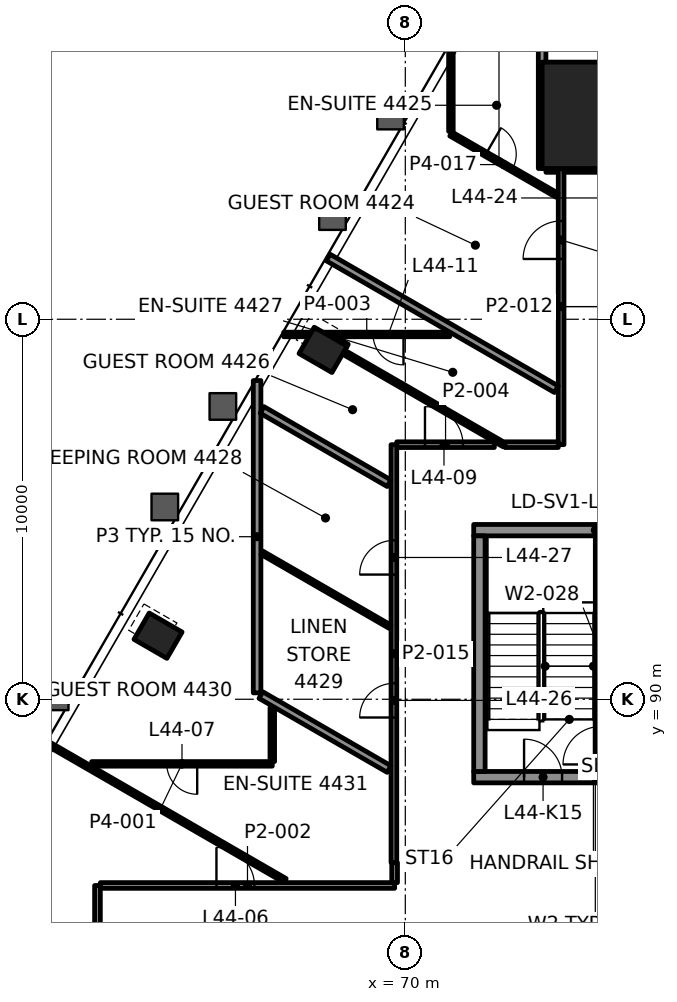
"""IFC4 building model, lengths in metres.
Left out: names, types, materials, properties, quantities, classifications, styles, units other than length and angle.
Written with IfcOpenShell. Run it as: python <this file> out.ifc"""

import sys

from ifc_helpers import new_model, si_unit, direction, frame, frame_2d, origin, origin_2d, place, context, subcontext, project, spatial, rectangle, hollow_rectangle, extrude, element, fill, save


model = new_model("IFC4")
c1 = context("Model", 3, precision=1e-05, world=origin(), true_north=direction((0.0, 1.0)))
c2 = subcontext(c1, "Body", "Model", "MODEL_VIEW")
j1 = project(units=[si_unit("LENGTHUNIT", "METRE"), si_unit("PLANEANGLEUNIT", "RADIAN")], contexts=[c1])
p1 = place(None, origin())
s1 = spatial("IfcSite", under=j1, at=p1, CompositionType="ELEMENT")
p2 = place(p1, origin())
s2 = spatial("IfcBuilding", under=s1, at=p2, CompositionType="ELEMENT")
p3 = place(p2, frame((0.0, 0.0, 190.9)))
s3 = spatial("IfcBuildingStorey", under=s2, at=p3, CompositionType="ELEMENT", Elevation=190.9)
p4 = place(p3, frame((75.0, 105.367, 0.0), z_axis=(0.0, 0.0, 1.0), x_axis=(-1.0, 0.0, 0.0)))
e1 = element("IfcColumn", 1, at=p4, inside=s3, PredefinedType="COLUMN", context=c2, shape_type="SweptSolid", body=[
    extrude(rectangle(XDim=2.8, YDim=2.8, at=origin_2d()), origin(), (0.0, 0.0, 1.0), 3.9),
])
for number, where, z_axis, x_axis in (
    (2, (67.836, 99.195, -0.0), (0.0, 0.0, 1.0), (-0.5, -0.866, 0.0)),
    (3, (63.494, 91.673, -0.0), (0.0, 0.0, 1.0), (-0.5, -0.866, 0.0)),
):
    element("IfcColumn", number, at=place(p3, frame(where, z_axis=z_axis, x_axis=x_axis)), inside=s3, PredefinedType="COLUMN", context=c2, shape_type="SweptSolid", body=[
        extrude(hollow_rectangle(XDim=0.8, YDim=1.0, WallThickness=0.05, at=origin_2d()), origin(), (0.0, 0.0, 1.0), 3.9),
    ])
p5 = place(p3, frame((71.8, 87.95, 0.0), z_axis=(0.0, 0.0, 1.0), x_axis=(1.0, 0.0, 0.0)))
e4 = element("IfcWall", 4, at=p5, inside=s3, PredefinedType="SHEAR", context=c2, shape_type="SweptSolid", body=[
    extrude(rectangle(XDim=6.4, YDim=0.3, at=frame_2d((3.2, 0.0))), origin(), (0.0, 0.0, 1.0), 3.7),
])
p6 = place(p5, frame((1.325, 0.0, 0.0)))
e5 = element("IfcOpeningElement", 5, at=p6, cuts=e4, PredefinedType="OPENING", context=c2, shape_type="SweptSolid", body=[
    extrude(rectangle(XDim=1.0, YDim=2.1, at=frame_2d((0.5, 1.05))), frame((0.0, 0.16, 0.0), z_axis=(0.0, -1.0, 0.0), x_axis=(1.0, 0.0, 0.0)), (0.0, 0.0, 1.0), 0.32),
])
p7 = place(p5, frame((4.125, 0.0, 0.0)))
e6 = element("IfcOpeningElement", 6, at=p7, cuts=e4, PredefinedType="OPENING", context=c2, shape_type="SweptSolid", body=[
    extrude(rectangle(XDim=1.2, YDim=2.1, at=frame_2d((0.6, 1.05))), frame((0.0, 0.16, 0.0), z_axis=(0.0, -1.0, 0.0), x_axis=(1.0, 0.0, 0.0)), (0.0, 0.0, 1.0), 0.32),
])
p8 = place(p3, frame((71.8, 94.45, 0.0), z_axis=(0.0, 0.0, 1.0), x_axis=(1.0, 0.0, 0.0)))
e7 = element("IfcWall", 7, at=p8, inside=s3, PredefinedType="SHEAR", context=c2, shape_type="SweptSolid", body=[
    extrude(rectangle(XDim=6.4, YDim=0.3, at=frame_2d((3.2, 0.0))), origin(), (0.0, 0.0, 1.0), 3.7),
])
p9 = place(p3, frame((71.95, 88.1, 0.0), z_axis=(0.0, 0.0, 1.0), x_axis=(0.0, 1.0, 0.0)))
e8 = element("IfcWall", 8, at=p9, inside=s3, PredefinedType="SHEAR", context=c2, shape_type="SweptSolid", body=[
    extrude(rectangle(XDim=6.2, YDim=0.3, at=frame_2d((3.1, 0.0))), origin(), (0.0, 0.0, 1.0), 3.7),
])
p10 = place(p3, frame((75.15, 88.1, 0.0), z_axis=(0.0, 0.0, 1.0), x_axis=(0.0, 1.0, 0.0)))
e9 = element("IfcWall", 9, at=p10, inside=s3, PredefinedType="SHEAR", context=c2, shape_type="SweptSolid", body=[
    extrude(rectangle(XDim=6.2, YDim=0.3, at=frame_2d((3.1, 0.0))), origin(), (0.0, 0.0, 1.0), 3.7),
])
p11 = place(p10, frame((0.185, 0.0, 0.0)))
e10 = element("IfcOpeningElement", 10, at=p11, cuts=e9, PredefinedType="OPENING", context=c2, shape_type="SweptSolid", body=[
    extrude(rectangle(XDim=1.0, YDim=2.1, at=frame_2d((0.5, 1.05))), frame((0.0, 0.16, 0.0), z_axis=(0.0, -1.0, 0.0), x_axis=(1.0, 0.0, 0.0)), (0.0, 0.0, 1.0), 0.32),
])
p12 = place(p3, frame((61.976, 85.1, 0.0), z_axis=(0.0, 0.0, 1.0), x_axis=(1.0, 0.0, 0.0)))
e11 = element("IfcWall", 11, at=p12, inside=s3, PredefinedType="PARTITIONING", context=c2, shape_type="SweptSolid", body=[
    extrude(rectangle(XDim=7.744, YDim=0.15, at=frame_2d((3.872, 0.0))), origin(), (0.0, 0.0, 1.0), 3.1),
])
p13 = place(p12, frame((3.055, 0.0, 0.0)))
e12 = element("IfcOpeningElement", 12, at=p13, cuts=e11, PredefinedType="OPENING", context=c2, shape_type="SweptSolid", body=[
    extrude(rectangle(XDim=1.0, YDim=2.1, at=frame_2d((0.5, 1.05))), frame((0.0, 0.085, 0.0), z_axis=(0.0, -1.0, 0.0), x_axis=(1.0, 0.0, 0.0)), (0.0, 0.0, 1.0), 0.17),
])
p14 = place(p3, frame((66.5, 88.3, 0.0), z_axis=(0.0, 0.0, 1.0), x_axis=(-1.0, 0.0, 0.0)))
e13 = element("IfcWall", 13, at=p14, inside=s3, PredefinedType="PARTITIONING", context=c2, shape_type="SweptSolid", body=[
    extrude(rectangle(XDim=4.751, YDim=0.12, at=frame_2d((2.376, 0.0))), origin(), (0.0, 0.0, 1.0), 3.097),
])
p15 = place(p14, frame((1.976, 0.0, 0.0)))
e14 = element("IfcOpeningElement", 14, at=p15, cuts=e13, PredefinedType="OPENING", context=c2, shape_type="SweptSolid", body=[
    extrude(rectangle(XDim=0.8, YDim=2.1, at=frame_2d((0.4, 1.05))), frame((0.0, 0.07, 0.0), z_axis=(0.0, -1.0, 0.0), x_axis=(1.0, 0.0, 0.0)), (0.0, 0.0, 1.0), 0.14),
])
p16 = place(p3, frame((69.775, 96.7, 0.0), z_axis=(0.0, 0.0, 1.0), x_axis=(1.0, 0.0, 0.0)))
e15 = element("IfcWall", 15, at=p16, inside=s3, PredefinedType="PARTITIONING", context=c2, shape_type="SweptSolid", body=[
    extrude(rectangle(XDim=2.567, YDim=0.15, at=frame_2d((1.284, 0.0))), origin(), (0.0, 0.0, 1.0), 3.1),
])
p17 = place(p16, frame((0.742, 0.0, 0.0)))
e16 = element("IfcOpeningElement", 16, at=p17, cuts=e15, PredefinedType="OPENING", context=c2, shape_type="SweptSolid", body=[
    extrude(rectangle(XDim=1.0, YDim=2.1, at=frame_2d((0.5, 1.05))), frame((0.0, 0.085, 0.0), z_axis=(0.0, -1.0, 0.0), x_axis=(1.0, 0.0, 0.0)), (0.0, 0.0, 1.0), 0.17),
])
p18 = place(p3, frame((71.17, 99.6, 0.0), z_axis=(0.0, 0.0, 1.0), x_axis=(-1.0, 0.0, 0.0)))
e17 = element("IfcWall", 17, at=p18, inside=s3, PredefinedType="PARTITIONING", context=c2, shape_type="SweptSolid", body=[
    extrude(rectangle(XDim=4.37, YDim=0.12, at=frame_2d((2.185, 0.0))), origin(), (0.0, 0.0, 1.0), 3.1),
])
p19 = place(p18, frame((1.218, 0.0, 0.0)))
e18 = element("IfcOpeningElement", 18, at=p19, cuts=e17, PredefinedType="OPENING", context=c2, shape_type="SweptSolid", body=[
    extrude(rectangle(XDim=0.8, YDim=2.1, at=frame_2d((0.4, 1.05))), frame((0.0, 0.07, 0.0), z_axis=(0.0, -1.0, 0.0), x_axis=(1.0, 0.0, 0.0)), (0.0, 0.0, 1.0), 0.14),
])
p20 = place(p3, frame((73.7, 103.967, 0.0), z_axis=(0.0, 0.0, 1.0), x_axis=(1.0, 0.0, 0.0)))
e19 = element("IfcWall", 19, at=p20, inside=s3, PredefinedType="PARTITIONING", context=c2, shape_type="SweptSolid", body=[
    extrude(rectangle(XDim=0.324, YDim=0.2, at=frame_2d((0.162, 0.0))), origin(), (0.0, 0.0, 1.0), 3.1),
])
p21 = place(p3, frame((74.1, 96.7, 0.0), z_axis=(0.0, 0.0, 1.0), x_axis=(0.0, 1.0, 0.0)))
e20 = element("IfcWall", 20, at=p21, inside=s3, PredefinedType="PARTITIONING", context=c2, shape_type="SweptSolid", body=[
    extrude(rectangle(XDim=7.267, YDim=0.15, at=frame_2d((3.633, 0.0))), origin(), (0.0, 0.0, 1.0), 3.1),
])
p22 = place(p21, frame((4.886, 0.0, 0.0)))
e21 = element("IfcOpeningElement", 21, at=p22, cuts=e20, PredefinedType="OPENING", context=c2, shape_type="SweptSolid", body=[
    extrude(rectangle(XDim=1.0, YDim=2.1, at=frame_2d((0.5, 1.05))), frame((0.0, 0.085, 0.0), z_axis=(0.0, -1.0, 0.0), x_axis=(1.0, 0.0, 0.0)), (0.0, 0.0, 1.0), 0.17),
])
p23 = place(p3, frame((73.6, 103.967, 0.0), z_axis=(0.0, 0.0, 1.0), x_axis=(0.0, 1.0, 0.0)))
e22 = element("IfcWall", 22, at=p23, inside=s3, PredefinedType="PARTITIONING", context=c2, shape_type="SweptSolid", body=[
    extrude(rectangle(XDim=3.26, YDim=0.2, at=frame_2d((1.63, 0.0))), origin(), (0.0, 0.0, 1.0), 3.1),
])
p24 = place(p3, frame((71.2, 104.945, 0.0), z_axis=(0.0, 0.0, 1.0), x_axis=(0.0, 1.0, 0.0)))
e23 = element("IfcWall", 23, at=p24, inside=s3, PredefinedType="PARTITIONING", context=c2, shape_type="SweptSolid", body=[
    extrude(rectangle(XDim=2.252, YDim=0.12, at=frame_2d((1.126, 0.0))), origin(), (0.0, 0.0, 1.0), 3.1),
])
p25 = place(p3, frame((69.719, 85.175, 0.0), z_axis=(0.0, 0.0, 1.0), x_axis=(0.0, 1.0, 0.0)))
e24 = element("IfcWall", 24, at=p25, inside=s3, PredefinedType="PARTITIONING", context=c2, shape_type="SweptSolid", body=[
    extrude(rectangle(XDim=0.525, YDim=0.15, at=frame_2d((0.262, 0.0))), origin(), (0.0, 0.0, 1.0), 3.1),
])
p26 = place(p3, frame((69.7, 85.7, 0.0), z_axis=(0.0, 0.0, 1.0), x_axis=(0.0, 1.0, 0.0)))
e25 = element("IfcWall", 25, at=p26, inside=s3, PredefinedType="PARTITIONING", context=c2, shape_type="SweptSolid", body=[
    extrude(rectangle(XDim=10.999, YDim=0.15, at=frame_2d((5.5, 0.0))), origin(), (0.0, 0.0, 1.0), 3.097),
])
p27 = place(p26, frame((3.82, 0.0, 0.0)))
e26 = element("IfcOpeningElement", 26, at=p27, cuts=e25, PredefinedType="OPENING", context=c2, shape_type="SweptSolid", body=[
    extrude(rectangle(XDim=0.9, YDim=2.1, at=frame_2d((0.45, 1.05))), frame((0.0, 0.085, 0.0), z_axis=(0.0, -1.0, 0.0), x_axis=(1.0, 0.0, 0.0)), (0.0, 0.0, 1.0), 0.17),
])
p28 = place(p26, frame((7.581, 0.0, 0.0)))
e27 = element("IfcOpeningElement", 27, at=p28, cuts=e25, PredefinedType="OPENING", context=c2, shape_type="SweptSolid", body=[
    extrude(rectangle(XDim=0.9, YDim=2.1, at=frame_2d((0.45, 1.05))), frame((0.0, 0.085, 0.0), z_axis=(0.0, -1.0, 0.0), x_axis=(1.0, 0.0, 0.0)), (0.0, 0.0, 1.0), 0.17),
])
p29 = place(p3, frame((66.5, 88.361, 0.0), z_axis=(0.0, 0.0, 1.0), x_axis=(0.0, 1.0, 0.0)))
e28 = element("IfcWall", 28, at=p29, inside=s3, PredefinedType="PARTITIONING", context=c2, shape_type="SweptSolid", body=[
    extrude(rectangle(XDim=1.421, YDim=0.12, at=frame_2d((0.71, 0.0))), origin(), (0.0, 0.0, 1.0), 3.1),
])
p30 = place(p3, frame((66.1, 90.169, 0.0), z_axis=(0.0, 0.0, 1.0), x_axis=(0.0, 1.0, 0.0)))
e29 = element("IfcWall", 29, at=p30, inside=s3, PredefinedType="PARTITIONING", context=c2, shape_type="SweptSolid", body=[
    extrude(rectangle(XDim=8.218, YDim=0.2, at=frame_2d((4.109, 0.0))), origin(), (0.0, 0.0, 1.0), 3.022),
])
p31 = place(p3, frame((61.9, 68.476, 0.0), z_axis=(0.0, 0.0, 1.0), x_axis=(0.0, 1.0, 0.0)))
e30 = element("IfcWall", 30, at=p31, inside=s3, PredefinedType="PARTITIONING", context=c2, shape_type="SweptSolid", body=[
    extrude(rectangle(XDim=16.624, YDim=0.15, at=frame_2d((8.312, 0.0))), origin(), (0.0, 0.0, 1.0), 3.1),
])
p32 = place(p31, frame((8.276, 0.0, 0.0)))
e31 = element("IfcOpeningElement", 31, at=p32, cuts=e30, PredefinedType="OPENING", context=c2, shape_type="SweptSolid", body=[
    extrude(rectangle(XDim=1.0, YDim=2.1, at=frame_2d((0.5, 1.05))), frame((0.0, 0.085, 0.0), z_axis=(0.0, -1.0, 0.0), x_axis=(1.0, 0.0, 0.0)), (0.0, 0.0, 1.0), 0.17),
])
p33 = place(p3, frame((71.2, 104.876, 0.0), z_axis=(0.0, 0.0, 1.0), x_axis=(0.866029130051, -0.499993545862, 0.0)))
e32 = element("IfcWall", 32, at=p33, inside=s3, PredefinedType="PARTITIONING", context=c2, shape_type="SweptSolid", body=[
    extrude(rectangle(XDim=3.222, YDim=0.12, at=frame_2d((1.611, 0.0))), origin(), (0.0, 0.0, 1.0), 3.1),
])
p34 = place(p33, frame((1.061, 0.0, 0.0)))
e33 = element("IfcOpeningElement", 33, at=p34, cuts=e32, PredefinedType="OPENING", context=c2, shape_type="SweptSolid", body=[
    extrude(rectangle(XDim=0.8, YDim=2.1, at=frame_2d((0.4, 1.05))), frame((0.0, 0.07, 0.0), z_axis=(0.0, -1.0, 0.0), x_axis=(1.0, 0.0, 0.0)), (0.0, 0.0, 1.0), 0.14),
])
p35 = place(p3, frame((73.973, 98.159, 0.0), z_axis=(0.0, 0.0, 1.0), x_axis=(-0.866026061359, 0.499998861046, 0.0)))
e34 = element("IfcWall", 34, at=p35, inside=s3, PredefinedType="PARTITIONING", context=c2, shape_type="SweptSolid", body=[
    extrude(rectangle(XDim=6.932, YDim=0.2, at=frame_2d((3.466, 0.0))), origin(), (0.0, 0.0, 1.0), 3.1),
])
p36 = place(p3, frame((68.469, 99.291, 0.0), z_axis=(0.0, 0.0, 1.0), x_axis=(-0.865986299303, 0.500067724834, 0.0)))
e35 = element("IfcWall", 35, at=p36, inside=s3, PredefinedType="PARTITIONING", context=c2, shape_type="SweptSolid", body=[
    extrude(rectangle(XDim=0.388, YDim=0.12, at=frame_2d((0.194, 0.0))), origin(), (0.0, 0.0, 1.0), 3.1),
])
p37 = place(p3, frame((72.592, 96.7, 0.0), z_axis=(0.0, 0.0, 1.0), x_axis=(-0.866036013313, 0.499981623307, 0.0)))
e36 = element("IfcWall", 36, at=p37, inside=s3, PredefinedType="PARTITIONING", context=c2, shape_type="SweptSolid", body=[
    extrude(rectangle(XDim=4.865, YDim=0.12, at=frame_2d((2.433, 0.0))), origin(), (0.0, 0.0, 1.0), 3.1),
])
p38 = place(p3, frame((69.573, 95.685, 0.0), z_axis=(0.0, 0.0, 1.0), x_axis=(-0.8660191159, 0.500010890777, 0.0)))
e37 = element("IfcWall", 37, at=p38, inside=s3, PredefinedType="PARTITIONING", context=c2, shape_type="SweptSolid", body=[
    extrude(rectangle(XDim=3.859, YDim=0.2, at=frame_2d((1.929, 0.0))), origin(), (0.0, 0.0, 1.0), 3.022),
])
p39 = place(p3, frame((69.599, 91.909, 0.0), z_axis=(0.0, 0.0, 1.0), x_axis=(-0.866016482536, 0.500015451737, 0.0)))
e38 = element("IfcWall", 38, at=p39, inside=s3, PredefinedType="PARTITIONING", context=c2, shape_type="SweptSolid", body=[
    extrude(rectangle(XDim=3.895, YDim=0.1, at=frame_2d((1.948, 0.0))), origin(), (0.0, 0.0, 1.0), 3.1),
])
p40 = place(p3, frame((69.573, 88.163, 0.0), z_axis=(0.0, 0.0, 1.0), x_axis=(-0.866043624834, 0.499968438888, 0.0)))
e39 = element("IfcWall", 39, at=p40, inside=s3, PredefinedType="PARTITIONING", context=c2, shape_type="SweptSolid", body=[
    extrude(rectangle(XDim=3.895, YDim=0.2, at=frame_2d((1.947, 0.0))), origin(), (0.0, 0.0, 1.0), 3.1),
])
p41 = place(p3, frame((66.835, 85.23, 0.0), z_axis=(0.0, 0.0, 1.0), x_axis=(-0.866029508188, 0.499992890897, 0.0)))
e40 = element("IfcWall", 40, at=p41, inside=s3, PredefinedType="PARTITIONING", context=c2, shape_type="SweptSolid", body=[
    extrude(rectangle(XDim=7.215, YDim=0.12, at=frame_2d((3.608, 0.0))), origin(), (0.0, 0.0, 1.0), 3.022),
])
p42 = place(p3, frame((72.622, 96.7, 0.0), z_axis=(0.0, 0.0, 1.0), x_axis=(1.0, 0.0, 0.0)))
e41 = element("IfcWall", 41, at=p42, inside=s3, PredefinedType="PARTITIONING", context=c2, shape_type="SweptSolid", body=[
    extrude(rectangle(XDim=1.403, YDim=0.15, at=frame_2d((0.701, 0.0))), origin(), (0.0, 0.0, 1.0), 3.1),
])
p43 = place(p3, frame((74.175, 103.967, 0.0), z_axis=(0.0, 0.0, 1.0), x_axis=(1.0, 0.0, 0.0)))
e42 = element("IfcWall", 42, at=p43, inside=s3, PredefinedType="PARTITIONING", context=c2, shape_type="SweptSolid", body=[
    extrude(rectangle(XDim=1.649, YDim=0.2, at=frame_2d((0.825, 0.0))), origin(), (0.0, 0.0, 1.0), 3.097),
])
p44 = place(p13, origin())
e43 = element("IfcDoor", 43, at=p44, inside=s3, OperationType="SINGLE_SWING_LEFT", PredefinedType="DOOR", context=c2, shape_type="SweptSolid", body=[
    extrude(rectangle(XDim=1.0, YDim=2.1, at=frame_2d((0.5, 1.05))), frame((0.0, 0.025, 0.0), z_axis=(0.0, -1.0, 0.0), x_axis=(1.0, 0.0, 0.0)), (0.0, 0.0, 1.0), 0.05),
])
fill(e12, e43)
p45 = place(p15, origin())
e44 = element("IfcDoor", 44, at=p45, inside=s3, OperationType="SINGLE_SWING_LEFT", PredefinedType="DOOR", context=c2, shape_type="SweptSolid", body=[
    extrude(rectangle(XDim=0.8, YDim=2.1, at=frame_2d((0.4, 1.05))), frame((0.0, 0.025, 0.0), z_axis=(0.0, -1.0, 0.0), x_axis=(1.0, 0.0, 0.0)), (0.0, 0.0, 1.0), 0.05),
])
fill(e14, e44)
p46 = place(p17, origin())
e45 = element("IfcDoor", 45, at=p46, inside=s3, OperationType="SINGLE_SWING_LEFT", PredefinedType="DOOR", context=c2, shape_type="SweptSolid", body=[
    extrude(rectangle(XDim=1.0, YDim=2.1, at=frame_2d((0.5, 1.05))), frame((0.0, 0.025, 0.0), z_axis=(0.0, -1.0, 0.0), x_axis=(1.0, 0.0, 0.0)), (0.0, 0.0, 1.0), 0.05),
])
fill(e16, e45)
p47 = place(p19, origin())
e46 = element("IfcDoor", 46, at=p47, inside=s3, OperationType="SINGLE_SWING_LEFT", PredefinedType="DOOR", context=c2, shape_type="SweptSolid", body=[
    extrude(rectangle(XDim=0.8, YDim=2.1, at=frame_2d((0.4, 1.05))), frame((0.0, 0.025, 0.0), z_axis=(0.0, -1.0, 0.0), x_axis=(1.0, 0.0, 0.0)), (0.0, 0.0, 1.0), 0.05),
])
fill(e18, e46)
p48 = place(p22, origin())
e47 = element("IfcDoor", 47, at=p48, inside=s3, OperationType="SINGLE_SWING_LEFT", PredefinedType="DOOR", context=c2, shape_type="SweptSolid", body=[
    extrude(rectangle(XDim=1.0, YDim=2.1, at=frame_2d((0.5, 1.05))), frame((0.0, 0.025, 0.0), z_axis=(0.0, -1.0, 0.0), x_axis=(1.0, 0.0, 0.0)), (0.0, 0.0, 1.0), 0.05),
])
fill(e21, e47)
p49 = place(p27, origin())
e48 = element("IfcDoor", 48, at=p49, inside=s3, OperationType="SINGLE_SWING_RIGHT", PredefinedType="DOOR", context=c2, shape_type="SweptSolid", body=[
    extrude(rectangle(XDim=0.9, YDim=2.1, at=frame_2d((0.45, 1.05))), frame((0.0, 0.025, 0.0), z_axis=(0.0, -1.0, 0.0), x_axis=(1.0, 0.0, 0.0)), (0.0, 0.0, 1.0), 0.05),
])
fill(e26, e48)
p50 = place(p28, origin())
e49 = element("IfcDoor", 49, at=p50, inside=s3, OperationType="SINGLE_SWING_LEFT", PredefinedType="DOOR", context=c2, shape_type="SweptSolid", body=[
    extrude(rectangle(XDim=0.9, YDim=2.1, at=frame_2d((0.45, 1.05))), frame((0.0, 0.025, 0.0), z_axis=(0.0, -1.0, 0.0), x_axis=(1.0, 0.0, 0.0)), (0.0, 0.0, 1.0), 0.05),
])
fill(e27, e49)
p51 = place(p34, origin())
e50 = element("IfcDoor", 50, at=p51, inside=s3, OperationType="SINGLE_SWING_LEFT", PredefinedType="DOOR", context=c2, shape_type="SweptSolid", body=[
    extrude(rectangle(XDim=0.8, YDim=2.1, at=frame_2d((0.4, 1.05))), frame((0.0, 0.025, 0.0), z_axis=(0.0, -1.0, 0.0), x_axis=(1.0, 0.0, 0.0)), (0.0, 0.0, 1.0), 0.05),
])
fill(e33, e50)
p52 = place(p6, origin())
e51 = element("IfcDoor", 51, at=p52, inside=s3, OperationType="SINGLE_SWING_RIGHT", PredefinedType="DOOR", context=c2, shape_type="SweptSolid", body=[
    extrude(rectangle(XDim=1.0, YDim=2.1, at=frame_2d((0.5, 1.05))), frame((0.0, 0.025, 0.0), z_axis=(0.0, -1.0, 0.0), x_axis=(1.0, 0.0, 0.0)), (0.0, 0.0, 1.0), 0.05),
])
fill(e5, e51)
save(model, sys.argv[1])
